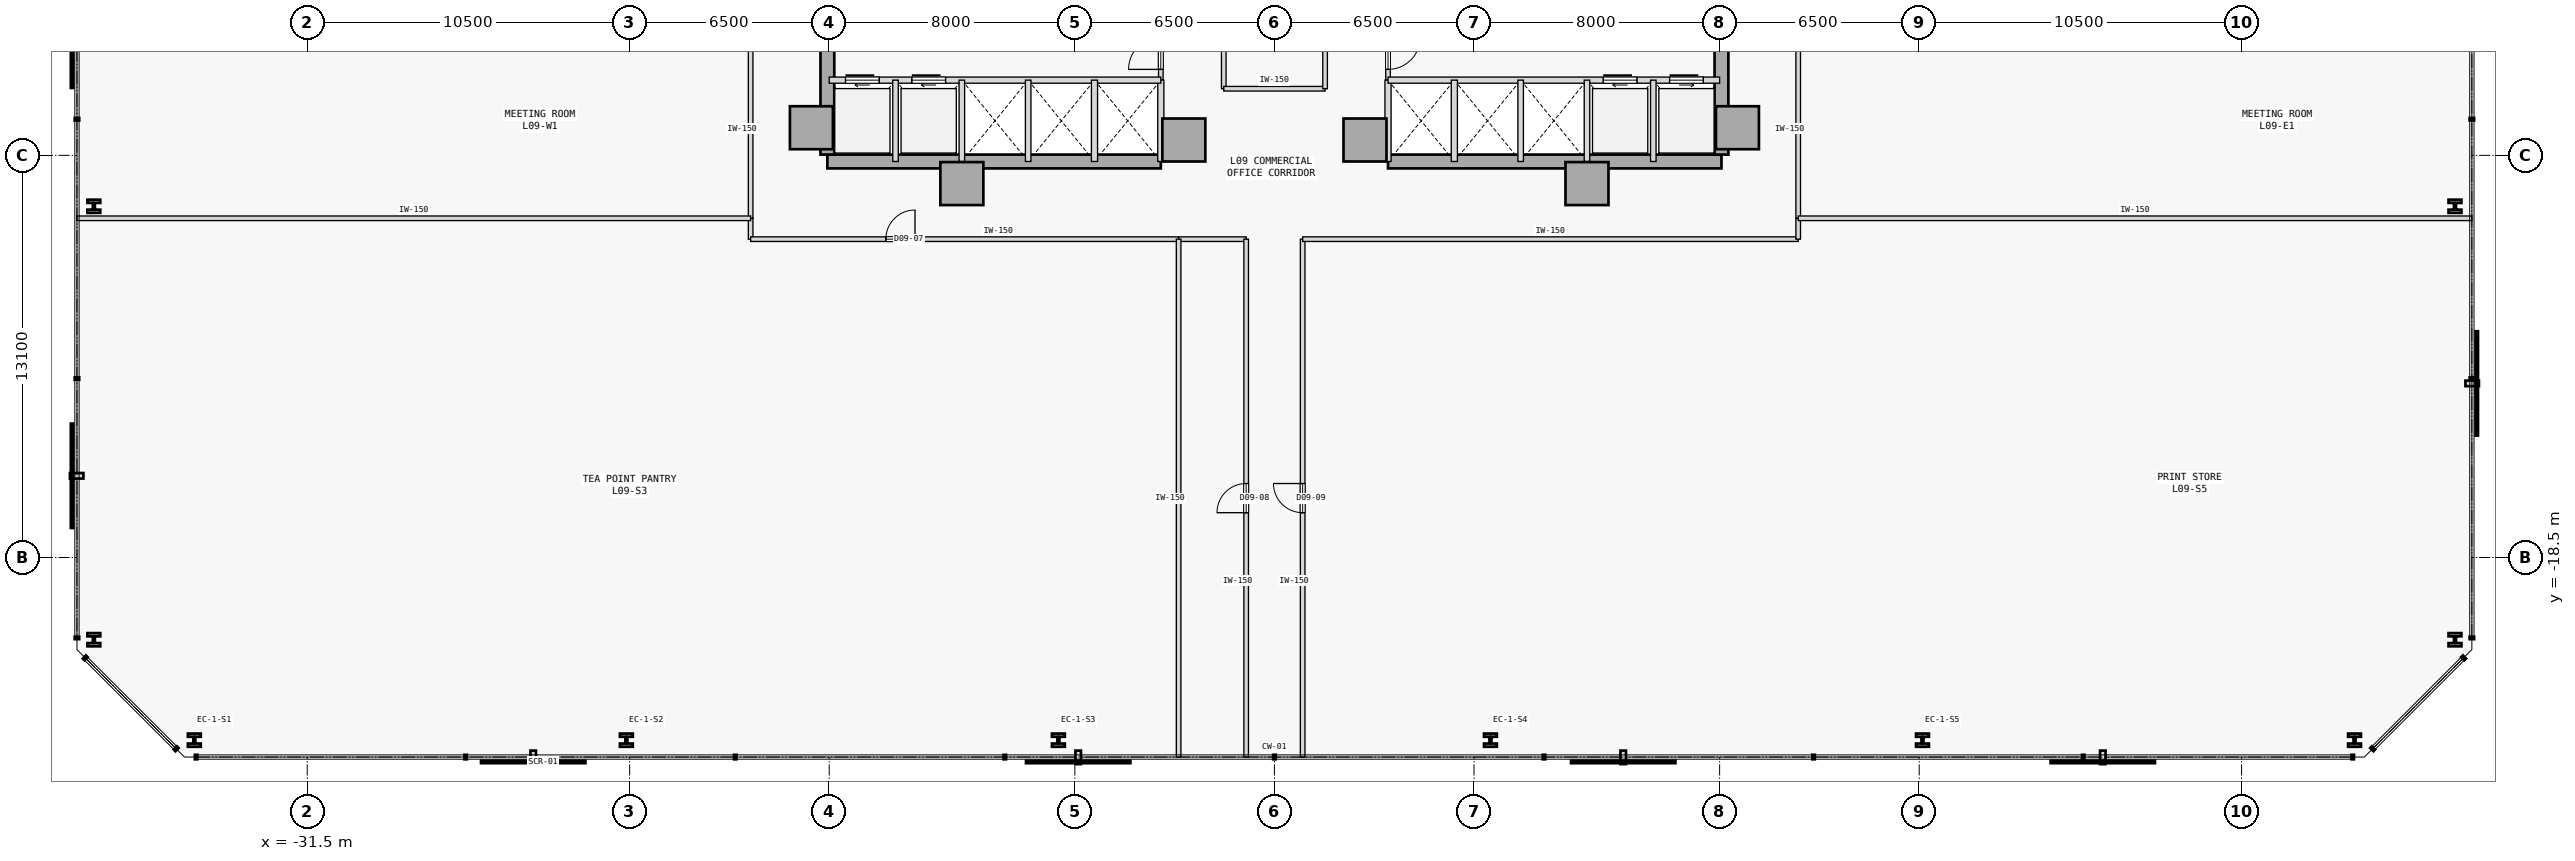
"""IFC4 building model, lengths in metres.
Left out: names, types, materials, properties, quantities, classifications, styles, units other than length and angle.
Written with IfcOpenShell. Run it as: python <this file> out.ifc"""

import sys

from ifc_helpers import new_model, si_unit, direction, frame, frame_2d, origin, origin_2d, place, context, subcontext, project, spatial, rectangle, i_section, extrude, element, fill, save


model = new_model("IFC4")
c1 = context("Model", 3, precision=1e-05, world=origin(), true_north=direction((0.0, 1.0)))
c2 = subcontext(c1, "Body", "Model", "MODEL_VIEW")
j1 = project(units=[si_unit("LENGTHUNIT", "METRE"), si_unit("PLANEANGLEUNIT", "RADIAN")], contexts=[c1])
p1 = place(None, origin())
s1 = spatial("IfcSite", under=j1, at=p1, CompositionType="ELEMENT")
p2 = place(p1, origin())
s2 = spatial("IfcBuilding", under=s1, at=p2, CompositionType="ELEMENT")
p3 = place(p2, frame((0.0, 0.0, 40.8)))
s3 = spatial("IfcBuildingStorey", under=s2, at=p3, CompositionType="ELEMENT", Elevation=40.8)
for number, where, z_axis, x_axis in (
    (1, (-15.08, -4.5, 0.0), (0.0, 0.0, 1.0), (1.0, 0.0, 0.0)),
    (2, (-10.18, -6.32, 0.0), (0.0, 0.0, 1.0), (1.0, 0.0, 0.0)),
    (3, (-2.95, -4.9, 0.0), (0.0, 0.0, 1.0), (1.0, 0.0, 0.0)),
    (4, (15.08, -4.5, 0.0), (0.0, 0.0, 1.0), (1.0, 0.0, 0.0)),
    (5, (10.18, -6.32, 0.0), (0.0, 0.0, 1.0), (1.0, 0.0, 0.0)),
    (6, (2.95, -4.9, 0.0), (0.0, 0.0, 1.0), (1.0, 0.0, 0.0)),
):
    element("IfcColumn", number, at=place(p3, frame(where, z_axis=z_axis, x_axis=x_axis)), inside=s3, PredefinedType="COLUMN", context=c2, shape_type="SweptSolid", body=[
        extrude(rectangle(XDim=1.4, YDim=1.4, at=origin_2d()), origin(), (0.0, 0.0, 1.0), 3.8),
    ])
p4 = place(p3, frame((-14.56, -5.6, 0.0), z_axis=(0.0, 0.0, 1.0), x_axis=(1.0, 0.0, 0.0)))
e7 = element("IfcWall", 7, at=p4, inside=s3, PredefinedType="SHEAR", context=c2, shape_type="SweptSolid", body=[
    extrude(rectangle(XDim=10.86, YDim=0.45, at=frame_2d((5.43, 0.0))), origin(), (0.0, 0.0, 1.0), 3.575),
])
p5 = place(p3, frame((-14.56, -5.375, 0.0), z_axis=(0.0, 0.0, 1.0), x_axis=(0.0, 1.0, 0.0)))
e8 = element("IfcWall", 8, at=p5, inside=s3, PredefinedType="SHEAR", context=c2, shape_type="SweptSolid", body=[
    extrude(rectangle(XDim=10.75, YDim=0.45, at=frame_2d((5.375, 0.0))), origin(), (0.0, 0.0, 1.0), 3.575),
])
p6 = place(p3, frame((3.7, -5.6, 0.0), z_axis=(0.0, 0.0, 1.0), x_axis=(1.0, 0.0, 0.0)))
e9 = element("IfcWall", 9, at=p6, inside=s3, PredefinedType="SHEAR", context=c2, shape_type="SweptSolid", body=[
    extrude(rectangle(XDim=10.86, YDim=0.45, at=frame_2d((5.43, 0.0))), origin(), (0.0, 0.0, 1.0), 3.575),
])
p7 = place(p3, frame((14.56, -5.375, 0.0), z_axis=(0.0, 0.0, 1.0), x_axis=(0.0, 1.0, 0.0)))
e10 = element("IfcWall", 10, at=p7, inside=s3, PredefinedType="SHEAR", context=c2, shape_type="SweptSolid", body=[
    extrude(rectangle(XDim=10.75, YDim=0.45, at=frame_2d((5.375, 0.0))), origin(), (0.0, 0.0, 1.0), 3.575),
])
for number, where, z_axis, x_axis in (
    (11, (-35.178, -24.45, 0.0), (0.0, 0.0, 1.0), (1.0, 0.0, 0.0)),
    (12, (-21.107, -24.45, 0.0), (0.0, 0.0, 1.0), (1.0, 0.0, 0.0)),
    (13, (-7.036, -24.45, 0.0), (0.0, 0.0, 1.0), (1.0, 0.0, 0.0)),
    (14, (7.036, -24.45, 0.0), (0.0, 0.0, 1.0), (1.0, 0.0, 0.0)),
    (15, (21.107, -24.45, 0.0), (0.0, 0.0, 1.0), (1.0, 0.0, 0.0)),
    (16, (35.178, -24.45, 0.0), (0.0, 0.0, 1.0), (1.0, 0.0, 0.0)),
    (17, (38.45, -21.178, 0.0), (0.0, 0.0, 1.0), (1.0, 0.0, 0.0)),
    (18, (38.45, -7.059, 0.0), (0.0, 0.0, 1.0), (1.0, 0.0, 0.0)),
    (19, (-38.45, -7.059, 0.0), (0.0, 0.0, 1.0), (1.0, 0.0, 0.0)),
    (20, (-38.45, -21.178, 0.0), (0.0, 0.0, 1.0), (1.0, 0.0, 0.0)),
):
    element("IfcColumn", number, at=place(p3, frame(where, z_axis=z_axis, x_axis=x_axis)), inside=s3, PredefinedType="COLUMN", context=c2, shape_type="SweptSolid", body=[
        extrude(i_section(OverallWidth=0.42, OverallDepth=0.431, WebThickness=0.065, FlangeThickness=0.106, FilletRadius=0.015, at=origin_2d()), origin(), (0.0, 0.0, 1.0), 3.8),
    ])
p8 = place(p3, frame((-3.7, -2.95, 0.0), z_axis=(0.0, 0.0, 1.0), x_axis=(0.0, 1.0, 0.0)))
e21 = element("IfcWall", 21, at=p8, inside=s3, PredefinedType="PARTITIONING", context=c2, shape_type="SweptSolid", body=[
    extrude(rectangle(XDim=1.8, YDim=0.15, at=frame_2d((0.9, 0.0))), origin(), (0.0, 0.0, 1.0), 3.575),
])
p9 = place(p8, frame((0.35, 0.0, 0.0)))
e22 = element("IfcOpeningElement", 22, at=p9, cuts=e21, PredefinedType="OPENING", context=c2, shape_type="SweptSolid", body=[
    extrude(rectangle(XDim=1.05, YDim=2.18, at=frame_2d((0.525, 1.09))), frame((0.0, 0.085, 0.0), z_axis=(0.0, -1.0, 0.0), x_axis=(1.0, 0.0, 0.0)), (0.0, 0.0, 1.0), 0.17),
])
p10 = place(p3, frame((-3.7, -5.6, 0.0), z_axis=(0.0, 0.0, 1.0), x_axis=(0.0, 1.0, 0.0)))
e23 = element("IfcWall", 23, at=p10, inside=s3, PredefinedType="STANDARD", context=c2, shape_type="SweptSolid", body=[
    extrude(rectangle(XDim=2.65, YDim=0.2, at=frame_2d((1.325, 0.0))), origin(), (0.0, 0.0, 1.0), 3.575),
])
p11 = place(p3, frame((-14.5, -2.95, 0.0), z_axis=(0.0, 0.0, 1.0), x_axis=(1.0, 0.0, 0.0)))
e24 = element("IfcWall", 24, at=p11, inside=s3, PredefinedType="STANDARD", context=c2, shape_type="SweptSolid", body=[
    extrude(rectangle(XDim=10.8, YDim=0.2, at=frame_2d((5.4, 0.0))), origin(), (0.0, 0.0, 1.0), 3.575),
])
p12 = place(p11, frame((0.53, 0.0, 0.0)))
e25 = element("IfcOpeningElement", 25, at=p12, cuts=e24, PredefinedType="OPENING", context=c2, shape_type="SweptSolid", body=[
    extrude(rectangle(XDim=1.1, YDim=2.15, at=frame_2d((0.55, 1.075))), frame((0.0, 0.11, 0.0), z_axis=(0.0, -1.0, 0.0), x_axis=(1.0, 0.0, 0.0)), (0.0, 0.0, 1.0), 0.22),
])
p13 = place(p11, frame((2.69, 0.0, 0.0)))
e26 = element("IfcOpeningElement", 26, at=p13, cuts=e24, PredefinedType="OPENING", context=c2, shape_type="SweptSolid", body=[
    extrude(rectangle(XDim=1.1, YDim=2.15, at=frame_2d((0.55, 1.075))), frame((0.0, 0.11, 0.0), z_axis=(0.0, -1.0, 0.0), x_axis=(1.0, 0.0, 0.0)), (0.0, 0.0, 1.0), 0.22),
])
p14 = place(p3, frame((-5.86, -5.6, 0.0), z_axis=(0.0, 0.0, 1.0), x_axis=(0.0, 1.0, 0.0)))
e27 = element("IfcWall", 27, at=p14, inside=s3, PredefinedType="STANDARD", context=c2, shape_type="SweptSolid", body=[
    extrude(rectangle(XDim=2.65, YDim=0.2, at=frame_2d((1.325, 0.0))), origin(), (0.0, 0.0, 1.0), 3.575),
])
for number, where, z_axis, x_axis in (
    (28, (-12.34, -5.6, 0.0), (0.0, 0.0, 1.0), (0.0, 1.0, 0.0)),
    (29, (-10.18, -5.6, 0.0), (0.0, 0.0, 1.0), (0.0, 1.0, 0.0)),
    (30, (-8.02, -5.6, 0.0), (0.0, 0.0, 1.0), (0.0, 1.0, 0.0)),
):
    element("IfcWall", number, at=place(p3, frame(where, z_axis=z_axis, x_axis=x_axis)), inside=s3, PredefinedType="STANDARD", context=c2, shape_type="SweptSolid", body=[
        extrude(rectangle(XDim=2.65, YDim=0.18, at=frame_2d((1.325, 0.0))), origin(), (0.0, 0.0, 1.0), 3.575),
    ])
p15 = place(p3, frame((3.7, -2.95, 0.0), z_axis=(0.0, 0.0, 1.0), x_axis=(0.0, 1.0, 0.0)))
e31 = element("IfcWall", 31, at=p15, inside=s3, PredefinedType="PARTITIONING", context=c2, shape_type="SweptSolid", body=[
    extrude(rectangle(XDim=1.8, YDim=0.15, at=frame_2d((0.9, 0.0))), origin(), (0.0, 0.0, 1.0), 3.575),
])
p16 = place(p15, frame((0.35, 0.0, 0.0)))
e32 = element("IfcOpeningElement", 32, at=p16, cuts=e31, PredefinedType="OPENING", context=c2, shape_type="SweptSolid", body=[
    extrude(rectangle(XDim=1.05, YDim=2.18, at=frame_2d((0.525, 1.09))), frame((0.0, 0.085, 0.0), z_axis=(0.0, -1.0, 0.0), x_axis=(1.0, 0.0, 0.0)), (0.0, 0.0, 1.0), 0.17),
])
p17 = place(p3, frame((3.7, -5.6, 0.0), z_axis=(0.0, 0.0, 1.0), x_axis=(0.0, 1.0, 0.0)))
e33 = element("IfcWall", 33, at=p17, inside=s3, PredefinedType="STANDARD", context=c2, shape_type="SweptSolid", body=[
    extrude(rectangle(XDim=2.65, YDim=0.2, at=frame_2d((1.325, 0.0))), origin(), (0.0, 0.0, 1.0), 3.575),
])
p18 = place(p3, frame((3.7, -2.95, 0.0), z_axis=(0.0, 0.0, 1.0), x_axis=(1.0, 0.0, 0.0)))
e34 = element("IfcWall", 34, at=p18, inside=s3, PredefinedType="STANDARD", context=c2, shape_type="SweptSolid", body=[
    extrude(rectangle(XDim=10.8, YDim=0.2, at=frame_2d((5.4, 0.0))), origin(), (0.0, 0.0, 1.0), 3.575),
])
p19 = place(p18, frame((7.01, 0.0, 0.0)))
e35 = element("IfcOpeningElement", 35, at=p19, cuts=e34, PredefinedType="OPENING", context=c2, shape_type="SweptSolid", body=[
    extrude(rectangle(XDim=1.1, YDim=2.15, at=frame_2d((0.55, 1.075))), frame((0.0, 0.11, 0.0), z_axis=(0.0, -1.0, 0.0), x_axis=(1.0, 0.0, 0.0)), (0.0, 0.0, 1.0), 0.22),
])
p20 = place(p18, frame((9.17, 0.0, 0.0)))
e36 = element("IfcOpeningElement", 36, at=p20, cuts=e34, PredefinedType="OPENING", context=c2, shape_type="SweptSolid", body=[
    extrude(rectangle(XDim=1.1, YDim=2.15, at=frame_2d((0.55, 1.075))), frame((0.0, 0.11, 0.0), z_axis=(0.0, -1.0, 0.0), x_axis=(1.0, 0.0, 0.0)), (0.0, 0.0, 1.0), 0.22),
])
p21 = place(p3, frame((5.86, -5.6, 0.0), z_axis=(0.0, 0.0, 1.0), x_axis=(0.0, 1.0, 0.0)))
e37 = element("IfcWall", 37, at=p21, inside=s3, PredefinedType="STANDARD", context=c2, shape_type="SweptSolid", body=[
    extrude(rectangle(XDim=2.65, YDim=0.2, at=frame_2d((1.325, 0.0))), origin(), (0.0, 0.0, 1.0), 3.575),
])
for number, where, z_axis, x_axis in (
    (38, (12.34, -5.6, 0.0), (0.0, 0.0, 1.0), (0.0, 1.0, 0.0)),
    (39, (10.18, -5.6, 0.0), (0.0, 0.0, 1.0), (0.0, 1.0, 0.0)),
    (40, (8.02, -5.6, 0.0), (0.0, 0.0, 1.0), (0.0, 1.0, 0.0)),
):
    element("IfcWall", number, at=place(p3, frame(where, z_axis=z_axis, x_axis=x_axis)), inside=s3, PredefinedType="STANDARD", context=c2, shape_type="SweptSolid", body=[
        extrude(rectangle(XDim=2.65, YDim=0.18, at=frame_2d((1.325, 0.0))), origin(), (0.0, 0.0, 1.0), 3.575),
    ])
p22 = place(p3, frame((-1.65, -3.23, 0.0), z_axis=(0.0, 0.0, 1.0), x_axis=(0.0, 1.0, 0.0)))
e41 = element("IfcWall", 41, at=p22, inside=s3, PredefinedType="PARTITIONING", context=c2, shape_type="SweptSolid", body=[
    extrude(rectangle(XDim=6.46, YDim=0.15, at=frame_2d((3.23, 0.0))), origin(), (0.0, 0.0, 1.0), 3.575),
])
p23 = place(p22, frame((2.755, 0.0, 0.0)))
e42 = element("IfcOpeningElement", 42, at=p23, cuts=e41, PredefinedType="OPENING", context=c2, shape_type="SweptSolid", body=[
    extrude(rectangle(XDim=0.95, YDim=2.15, at=frame_2d((0.475, 1.075))), frame((0.0, 0.085, 0.0), z_axis=(0.0, -1.0, 0.0), x_axis=(1.0, 0.0, 0.0)), (0.0, 0.0, 1.0), 0.17),
])
p24 = place(p3, frame((-1.65, -3.23, 0.0), z_axis=(0.0, 0.0, 1.0), x_axis=(1.0, 0.0, 0.0)))
e43 = element("IfcWall", 43, at=p24, inside=s3, PredefinedType="PARTITIONING", context=c2, shape_type="SweptSolid", body=[
    extrude(rectangle(XDim=3.3, YDim=0.15, at=frame_2d((1.65, 0.0))), origin(), (0.0, 0.0, 1.0), 3.575),
])
p25 = place(p3, frame((1.65, -3.23, 0.0), z_axis=(0.0, 0.0, 1.0), x_axis=(0.0, 1.0, 0.0)))
e44 = element("IfcWall", 44, at=p25, inside=s3, PredefinedType="PARTITIONING", context=c2, shape_type="SweptSolid", body=[
    extrude(rectangle(XDim=6.46, YDim=0.15, at=frame_2d((3.23, 0.0))), origin(), (0.0, 0.0, 1.0), 3.575),
])
p26 = place(p3, frame((-17.059, -8.13, 0.0), z_axis=(0.0, 0.0, 1.0), x_axis=(0.0, 1.0, 0.0)))
e45 = element("IfcWall", 45, at=p26, inside=s3, PredefinedType="PARTITIONING", context=c2, shape_type="SweptSolid", body=[
    extrude(rectangle(XDim=0.68, YDim=0.15, at=frame_2d((0.34, 0.0))), origin(), (0.0, 0.0, 1.0), 3.575),
])
p27 = place(p3, frame((-17.059, -8.13, 0.0), z_axis=(0.0, 0.0, 1.0), x_axis=(1.0, 0.0, 0.0)))
e46 = element("IfcWall", 46, at=p27, inside=s3, PredefinedType="PARTITIONING", context=c2, shape_type="SweptSolid", body=[
    extrude(rectangle(XDim=13.939, YDim=0.15, at=frame_2d((6.969, 0.0))), origin(), (0.0, 0.0, 1.0), 3.575),
])
p28 = place(p27, frame((4.404, 0.0, 0.0)))
e47 = element("IfcOpeningElement", 47, at=p28, cuts=e46, PredefinedType="OPENING", context=c2, shape_type="SweptSolid", body=[
    extrude(rectangle(XDim=0.95, YDim=2.15, at=frame_2d((0.475, 1.075))), frame((0.0, 0.085, 0.0), z_axis=(0.0, -1.0, 0.0), x_axis=(1.0, 0.0, 0.0)), (0.0, 0.0, 1.0), 0.17),
])
p29 = place(p3, frame((-3.12, -8.13, 0.0), z_axis=(0.0, 0.0, 1.0), x_axis=(1.0, 0.0, 0.0)))
e48 = element("IfcWall", 48, at=p29, inside=s3, PredefinedType="PARTITIONING", context=c2, shape_type="SweptSolid", body=[
    extrude(rectangle(XDim=2.2, YDim=0.15, at=frame_2d((1.1, 0.0))), origin(), (0.0, 0.0, 1.0), 3.575),
])
p30 = place(p3, frame((-0.92, -25.0, 0.0), z_axis=(0.0, 0.0, 1.0), x_axis=(0.0, 1.0, 0.0)))
e49 = element("IfcWall", 49, at=p30, inside=s3, PredefinedType="PARTITIONING", context=c2, shape_type="SweptSolid", body=[
    extrude(rectangle(XDim=16.87, YDim=0.15, at=frame_2d((8.435, 0.0))), origin(), (0.0, 0.0, 1.0), 3.575),
])
p31 = place(p30, frame((7.96, 0.0, 0.0)))
e50 = element("IfcOpeningElement", 50, at=p31, cuts=e49, PredefinedType="OPENING", context=c2, shape_type="SweptSolid", body=[
    extrude(rectangle(XDim=0.95, YDim=2.15, at=frame_2d((0.475, 1.075))), frame((0.0, 0.085, 0.0), z_axis=(0.0, -1.0, 0.0), x_axis=(1.0, 0.0, 0.0)), (0.0, 0.0, 1.0), 0.17),
])
p32 = place(p3, frame((0.92, -25.0, 0.0), z_axis=(0.0, 0.0, 1.0), x_axis=(0.0, 1.0, 0.0)))
e51 = element("IfcWall", 51, at=p32, inside=s3, PredefinedType="PARTITIONING", context=c2, shape_type="SweptSolid", body=[
    extrude(rectangle(XDim=16.87, YDim=0.15, at=frame_2d((8.435, 0.0))), origin(), (0.0, 0.0, 1.0), 3.575),
])
p33 = place(p32, frame((7.96, 0.0, 0.0)))
e52 = element("IfcOpeningElement", 52, at=p33, cuts=e51, PredefinedType="OPENING", context=c2, shape_type="SweptSolid", body=[
    extrude(rectangle(XDim=0.95, YDim=2.15, at=frame_2d((0.475, 1.075))), frame((0.0, 0.085, 0.0), z_axis=(0.0, -1.0, 0.0), x_axis=(1.0, 0.0, 0.0)), (0.0, 0.0, 1.0), 0.17),
])
p34 = place(p3, frame((0.92, -8.13, 0.0), z_axis=(0.0, 0.0, 1.0), x_axis=(1.0, 0.0, 0.0)))
e53 = element("IfcWall", 53, at=p34, inside=s3, PredefinedType="PARTITIONING", context=c2, shape_type="SweptSolid", body=[
    extrude(rectangle(XDim=16.139, YDim=0.15, at=frame_2d((8.07, 0.0))), origin(), (0.0, 0.0, 1.0), 3.575),
])
p35 = place(p3, frame((17.059, -8.13, 0.0), z_axis=(0.0, 0.0, 1.0), x_axis=(0.0, 1.0, 0.0)))
e54 = element("IfcWall", 54, at=p35, inside=s3, PredefinedType="PARTITIONING", context=c2, shape_type="SweptSolid", body=[
    extrude(rectangle(XDim=0.68, YDim=0.15, at=frame_2d((0.34, 0.0))), origin(), (0.0, 0.0, 1.0), 3.575),
])
for number, where, z_axis, x_axis in (
    (55, (-17.059, -7.45, 0.0), (0.0, 0.0, 1.0), (0.0, 1.0, 0.0)),
    (56, (17.059, -7.45, 0.0), (0.0, 0.0, 1.0), (0.0, 1.0, 0.0)),
):
    element("IfcWall", number, at=place(p3, frame(where, z_axis=z_axis, x_axis=x_axis)), inside=s3, PredefinedType="PARTITIONING", context=c2, shape_type="SweptSolid", body=[
        extrude(rectangle(XDim=6.53, YDim=0.15, at=frame_2d((3.265, 0.0))), origin(), (0.0, 0.0, 1.0), 3.575),
    ])
p36 = place(p3, frame((-3.12, -25.0, 0.0), z_axis=(0.0, 0.0, 1.0), x_axis=(0.0, 1.0, 0.0)))
e57 = element("IfcWall", 57, at=p36, inside=s3, PredefinedType="PARTITIONING", context=c2, shape_type="SweptSolid", body=[
    extrude(rectangle(XDim=16.87, YDim=0.15, at=frame_2d((8.435, 0.0))), origin(), (0.0, 0.0, 1.0), 3.575),
])
for number, where, z_axis, x_axis in (
    (58, (-39.0, -7.45, 0.0), (0.0, 0.0, 1.0), (1.0, 0.0, 0.0)),
    (59, (17.059, -7.45, 0.0), (0.0, 0.0, 1.0), (1.0, 0.0, 0.0)),
):
    element("IfcWall", number, at=place(p3, frame(where, z_axis=z_axis, x_axis=x_axis)), inside=s3, PredefinedType="PARTITIONING", context=c2, shape_type="SweptSolid", body=[
        extrude(rectangle(XDim=21.941, YDim=0.15, at=frame_2d((10.97, 0.0))), origin(), (0.0, 0.0, 1.0), 3.575),
    ])
p37 = place(p9, origin())
e60 = element("IfcDoor", 60, at=p37, inside=s3, OperationType="SINGLE_SWING_LEFT", PredefinedType="DOOR", context=c2, shape_type="SweptSolid", body=[
    extrude(rectangle(XDim=1.05, YDim=2.18, at=frame_2d((0.525, 1.09))), frame((0.0, 0.025, 0.0), z_axis=(0.0, -1.0, 0.0), x_axis=(1.0, 0.0, 0.0)), (0.0, 0.0, 1.0), 0.05),
])
fill(e22, e60)
p38 = place(p12, origin())
e61 = element("IfcDoor", 61, at=p38, inside=s3, OperationType="SLIDING_TO_RIGHT", PredefinedType="DOOR", context=c2, shape_type="SweptSolid", body=[
    extrude(rectangle(XDim=1.1, YDim=2.15, at=frame_2d((0.55, 1.075))), frame((0.0, 0.025, 0.0), z_axis=(0.0, -1.0, 0.0), x_axis=(1.0, 0.0, 0.0)), (0.0, 0.0, 1.0), 0.05),
])
fill(e25, e61)
p39 = place(p13, origin())
e62 = element("IfcDoor", 62, at=p39, inside=s3, OperationType="SLIDING_TO_RIGHT", PredefinedType="DOOR", context=c2, shape_type="SweptSolid", body=[
    extrude(rectangle(XDim=1.1, YDim=2.15, at=frame_2d((0.55, 1.075))), frame((0.0, 0.025, 0.0), z_axis=(0.0, -1.0, 0.0), x_axis=(1.0, 0.0, 0.0)), (0.0, 0.0, 1.0), 0.05),
])
fill(e26, e62)
p40 = place(p16, frame((1.05, 0.0, 0.0), z_axis=(0.0, 0.0, 1.0), x_axis=(-1.0, 0.0, 0.0)))
e63 = element("IfcDoor", 63, at=p40, inside=s3, OperationType="SINGLE_SWING_RIGHT", PredefinedType="DOOR", context=c2, shape_type="SweptSolid", body=[
    extrude(rectangle(XDim=1.05, YDim=2.18, at=frame_2d((0.525, 1.09))), frame((0.0, 0.025, 0.0), z_axis=(0.0, -1.0, 0.0), x_axis=(1.0, 0.0, 0.0)), (0.0, 0.0, 1.0), 0.05),
])
fill(e32, e63)
p41 = place(p19, origin())
e64 = element("IfcDoor", 64, at=p41, inside=s3, OperationType="SLIDING_TO_RIGHT", PredefinedType="DOOR", context=c2, shape_type="SweptSolid", body=[
    extrude(rectangle(XDim=1.1, YDim=2.15, at=frame_2d((0.55, 1.075))), frame((0.0, 0.025, 0.0), z_axis=(0.0, -1.0, 0.0), x_axis=(1.0, 0.0, 0.0)), (0.0, 0.0, 1.0), 0.05),
])
fill(e35, e64)
p42 = place(p20, origin())
e65 = element("IfcDoor", 65, at=p42, inside=s3, OperationType="SLIDING_TO_LEFT", PredefinedType="DOOR", context=c2, shape_type="SweptSolid", body=[
    extrude(rectangle(XDim=1.1, YDim=2.15, at=frame_2d((0.55, 1.075))), frame((0.0, 0.025, 0.0), z_axis=(0.0, -1.0, 0.0), x_axis=(1.0, 0.0, 0.0)), (0.0, 0.0, 1.0), 0.05),
])
fill(e36, e65)
p43 = place(p28, origin())
e66 = element("IfcDoor", 66, at=p43, inside=s3, OperationType="SINGLE_SWING_RIGHT", PredefinedType="DOOR", context=c2, shape_type="SweptSolid", body=[
    extrude(rectangle(XDim=0.95, YDim=2.15, at=frame_2d((0.475, 1.075))), frame((0.0, 0.025, 0.0), z_axis=(0.0, -1.0, 0.0), x_axis=(1.0, 0.0, 0.0)), (0.0, 0.0, 1.0), 0.05),
])
fill(e47, e66)
p44 = place(p31, origin())
e67 = element("IfcDoor", 67, at=p44, inside=s3, OperationType="SINGLE_SWING_LEFT", PredefinedType="DOOR", context=c2, shape_type="SweptSolid", body=[
    extrude(rectangle(XDim=0.95, YDim=2.15, at=frame_2d((0.475, 1.075))), frame((0.0, 0.025, 0.0), z_axis=(0.0, -1.0, 0.0), x_axis=(1.0, 0.0, 0.0)), (0.0, 0.0, 1.0), 0.05),
])
fill(e50, e67)
p45 = place(p33, origin())
e68 = element("IfcDoor", 68, at=p45, inside=s3, OperationType="SINGLE_SWING_RIGHT", PredefinedType="DOOR", context=c2, shape_type="SweptSolid", body=[
    extrude(rectangle(XDim=0.95, YDim=2.15, at=frame_2d((0.475, 1.075))), frame((0.0, 0.025, 0.0), z_axis=(0.0, -1.0, 0.0), x_axis=(1.0, 0.0, 0.0)), (0.0, 0.0, 1.0), 0.05),
])
fill(e52, e68)
save(model, sys.argv[1])
